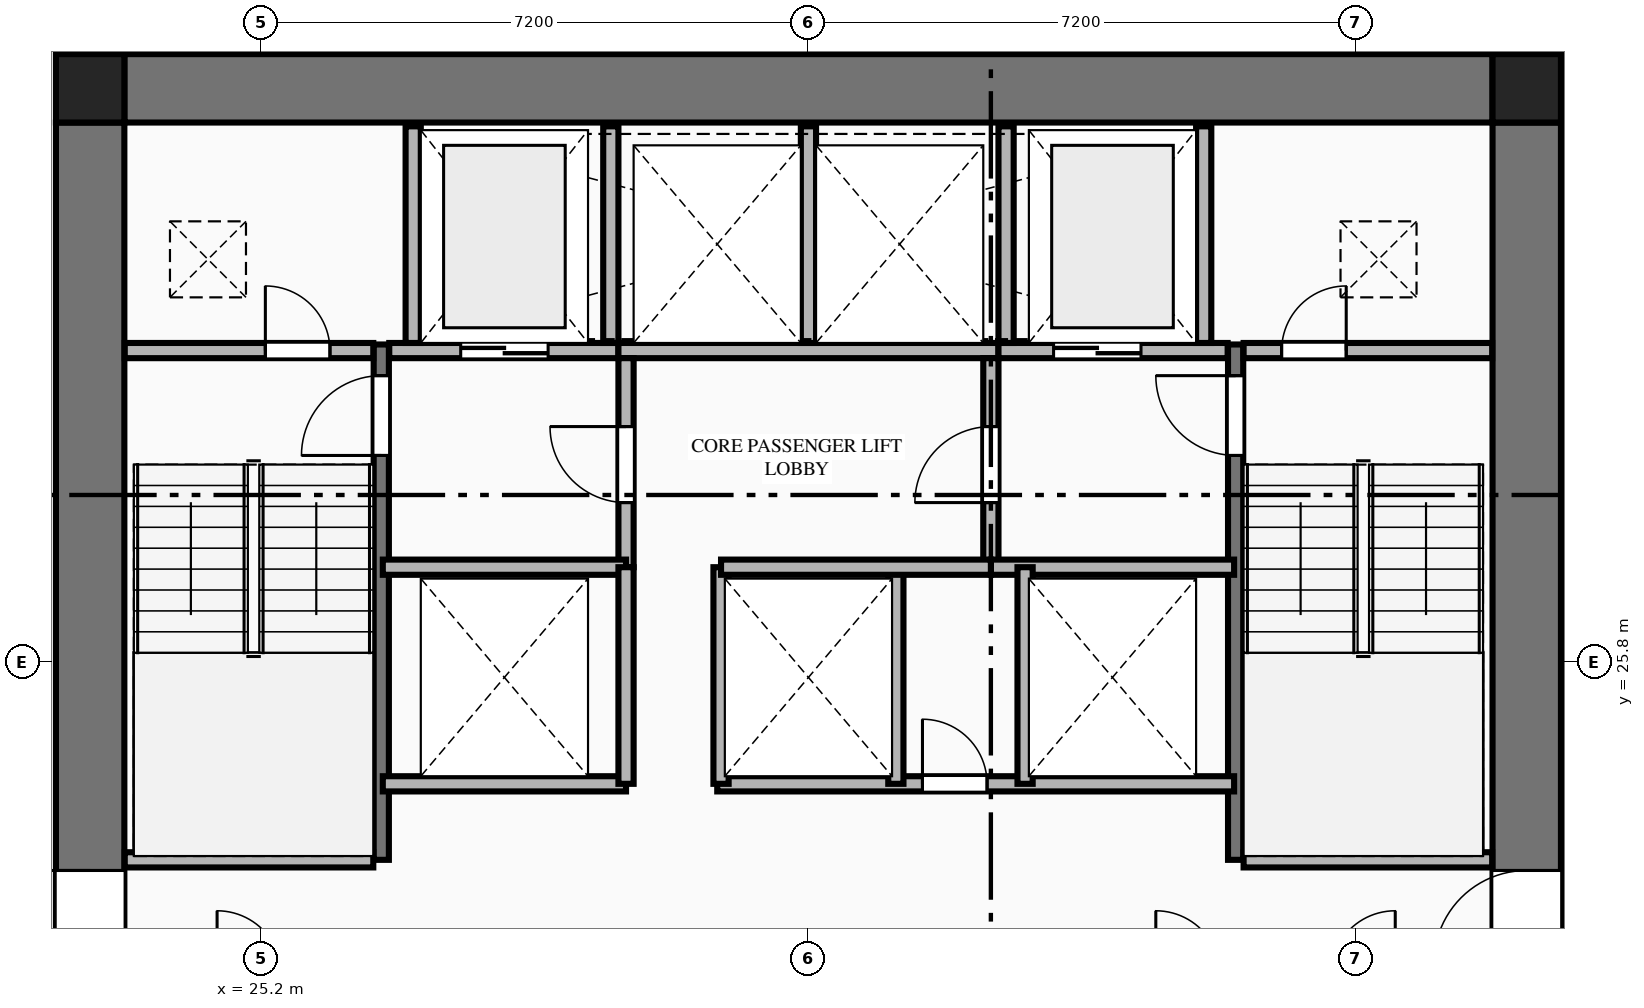
"""IFC4 building model, lengths in metres.
Left out: names, types, materials, properties, quantities, classifications, styles, units other than length and angle.
Written with IfcOpenShell. Run it as: python <this file> out.ifc"""

import sys

from ifc_helpers import new_model, si_unit, direction, frame, frame_2d, origin, origin_2d, place, context, subcontext, project, spatial, rectangle, extrude, element, fill, save


model = new_model("IFC4")
c1 = context("Model", 3, precision=1e-05, world=origin(), true_north=direction((0.0, 1.0)))
c2 = subcontext(c1, "Body", "Model", "MODEL_VIEW")
j1 = project(units=[si_unit("LENGTHUNIT", "METRE"), si_unit("PLANEANGLEUNIT", "RADIAN")], contexts=[c1])
p1 = place(None, origin())
s1 = spatial("IfcSite", under=j1, at=p1, CompositionType="ELEMENT")
p2 = place(p1, origin())
s2 = spatial("IfcBuilding", under=s1, at=p2, CompositionType="ELEMENT")
p3 = place(p2, frame((0.0, 0.0, 39.1)))
s3 = spatial("IfcBuildingStorey", under=s2, at=p3, CompositionType="ELEMENT", Elevation=39.1)
for number, where, z_axis, x_axis in (
    (1, (41.85, 33.35, 0.0), (0.0, 0.0, 1.0), (1.0, 0.0, 0.0)),
    (2, (22.95, 33.35, 0.0), (0.0, 0.0, 1.0), (1.0, 0.0, 0.0)),
):
    element("IfcColumn", number, at=place(p3, frame(where, z_axis=z_axis, x_axis=x_axis)), inside=s3, PredefinedType="COLUMN", context=c2, shape_type="SweptSolid", body=[
        extrude(rectangle(XDim=0.9, YDim=0.9, at=origin_2d()), origin(), (0.0, 0.0, 1.0), 3.55),
    ])
p4 = place(p3, frame((23.4, 33.35, 0.0), z_axis=(0.0, 0.0, 1.0), x_axis=(1.0, 0.0, 0.0)))
e3 = element("IfcWall", 3, at=p4, inside=s3, PredefinedType="SHEAR", context=c2, shape_type="SweptSolid", body=[
    extrude(rectangle(XDim=18.0, YDim=0.9, at=frame_2d((9.0, 0.0))), origin(), (0.0, 0.0, 1.0), 3.33),
])
p5 = place(p3, frame((22.95, 18.9, 0.0), z_axis=(0.0, 0.0, 1.0), x_axis=(0.0, 1.0, 0.0)))
e4 = element("IfcWall", 4, at=p5, inside=s3, PredefinedType="SHEAR", context=c2, shape_type="SweptSolid", body=[
    extrude(rectangle(XDim=14.0, YDim=0.9, at=frame_2d((7.0, 0.0))), origin(), (0.0, 0.0, 1.0), 3.33),
])
p6 = place(p5, frame((2.94, 0.0, 0.0)))
e5 = element("IfcOpeningElement", 5, at=p6, cuts=e4, PredefinedType="OPENING", context=c2, shape_type="SweptSolid", body=[
    extrude(rectangle(XDim=1.22, YDim=2.25, at=frame_2d((0.61, 1.125))), frame((0.0, 0.46, 0.0), z_axis=(0.0, -1.0, 0.0), x_axis=(1.0, 0.0, 0.0)), (0.0, 0.0, 1.0), 0.92),
])
p7 = place(p3, frame((41.85, 18.9, 0.0), z_axis=(0.0, 0.0, 1.0), x_axis=(0.0, 1.0, 0.0)))
e6 = element("IfcWall", 6, at=p7, inside=s3, PredefinedType="SHEAR", context=c2, shape_type="SweptSolid", body=[
    extrude(rectangle(XDim=14.0, YDim=0.9, at=frame_2d((7.0, 0.0))), origin(), (0.0, 0.0, 1.0), 3.33),
])
p8 = place(p7, frame((2.94, 0.0, 0.0)))
e7 = element("IfcOpeningElement", 7, at=p8, cuts=e6, PredefinedType="OPENING", context=c2, shape_type="SweptSolid", body=[
    extrude(rectangle(XDim=1.22, YDim=2.25, at=frame_2d((0.61, 1.125))), frame((0.0, 0.46, 0.0), z_axis=(0.0, -1.0, 0.0), x_axis=(1.0, 0.0, 0.0)), (0.0, 0.0, 1.0), 0.92),
])
p9 = place(p3, frame((26.78, 23.2, 0.0), z_axis=(0.0, 0.0, 1.0), x_axis=(0.0, 1.0, 0.0)))
e8 = element("IfcWall", 8, at=p9, inside=s3, PredefinedType="SHEAR", context=c2, shape_type="SweptSolid", body=[
    extrude(rectangle(XDim=6.78, YDim=0.2, at=frame_2d((3.39, 0.0))), origin(), (0.0, 0.0, 1.0), 3.55),
])
p10 = place(p9, frame((5.32, 0.0, 0.0)))
e9 = element("IfcOpeningElement", 9, at=p10, cuts=e8, PredefinedType="OPENING", context=c2, shape_type="SweptSolid", body=[
    extrude(rectangle(XDim=1.05, YDim=2.15, at=frame_2d((0.525, 1.075))), frame((0.0, 0.11, 0.0), z_axis=(0.0, -1.0, 0.0), x_axis=(1.0, 0.0, 0.0)), (0.0, 0.0, 1.0), 0.22),
])
p11 = place(p3, frame((23.405, 23.2, 0.0), z_axis=(0.0, 0.0, 1.0), x_axis=(1.0, 0.0, 0.0)))
e10 = element("IfcWall", 10, at=p11, inside=s3, PredefinedType="PLUMBINGWALL", context=c2, shape_type="SweptSolid", body=[
    extrude(rectangle(XDim=3.27, YDim=0.2, at=frame_2d((1.635, 0.0))), origin(), (0.0, 0.0, 1.0), 3.33),
])
p12 = place(p3, frame((38.02, 23.2, 0.0), z_axis=(0.0, 0.0, 1.0), x_axis=(0.0, 1.0, 0.0)))
e11 = element("IfcWall", 11, at=p12, inside=s3, PredefinedType="SHEAR", context=c2, shape_type="SweptSolid", body=[
    extrude(rectangle(XDim=6.78, YDim=0.2, at=frame_2d((3.39, 0.0))), origin(), (0.0, 0.0, 1.0), 3.55),
])
p13 = place(p12, frame((5.32, 0.0, 0.0)))
e12 = element("IfcOpeningElement", 12, at=p13, cuts=e11, PredefinedType="OPENING", context=c2, shape_type="SweptSolid", body=[
    extrude(rectangle(XDim=1.05, YDim=2.15, at=frame_2d((0.525, 1.075))), frame((0.0, 0.11, 0.0), z_axis=(0.0, -1.0, 0.0), x_axis=(1.0, 0.0, 0.0)), (0.0, 0.0, 1.0), 0.22),
])
p14 = place(p3, frame((38.125, 23.2, 0.0), z_axis=(0.0, 0.0, 1.0), x_axis=(1.0, 0.0, 0.0)))
e13 = element("IfcWall", 13, at=p14, inside=s3, PredefinedType="PLUMBINGWALL", context=c2, shape_type="SweptSolid", body=[
    extrude(rectangle(XDim=3.27, YDim=0.2, at=frame_2d((1.635, 0.0))), origin(), (0.0, 0.0, 1.0), 3.33),
])
p15 = place(p3, frame((23.405, 29.9, 0.0), z_axis=(0.0, 0.0, 1.0), x_axis=(1.0, 0.0, 0.0)))
e14 = element("IfcWall", 14, at=p15, inside=s3, PredefinedType="PLUMBINGWALL", context=c2, shape_type="SweptSolid", body=[
    extrude(rectangle(XDim=3.27, YDim=0.2, at=frame_2d((1.635, 0.0))), origin(), (0.0, 0.0, 1.0), 3.33),
])
p16 = place(p15, frame((1.85, 0.0, 0.0)))
e15 = element("IfcOpeningElement", 15, at=p16, cuts=e14, PredefinedType="OPENING", context=c2, shape_type="SweptSolid", body=[
    extrude(rectangle(XDim=0.85, YDim=2.05, at=frame_2d((0.425, 1.025))), frame((0.0, 0.11, 0.0), z_axis=(0.0, -1.0, 0.0), x_axis=(1.0, 0.0, 0.0)), (0.0, 0.0, 1.0), 0.22),
])
p17 = place(p3, frame((26.885, 29.9, 0.0), z_axis=(0.0, 0.0, 1.0), x_axis=(1.0, 0.0, 0.0)))
e16 = element("IfcWall", 16, at=p17, inside=s3, PredefinedType="PLUMBINGWALL", context=c2, shape_type="SweptSolid", body=[
    extrude(rectangle(XDim=3.015, YDim=0.2, at=frame_2d((1.507, 0.0))), origin(), (0.0, 0.0, 1.0), 3.33),
])
p18 = place(p17, frame((0.94, 0.0, 0.0)))
e17 = element("IfcOpeningElement", 17, at=p18, cuts=e16, PredefinedType="OPENING", context=c2, shape_type="SweptSolid", body=[
    extrude(rectangle(XDim=1.15, YDim=2.2, at=frame_2d((0.575, 1.1))), frame((0.0, 0.11, 0.0), z_axis=(0.0, -1.0, 0.0), x_axis=(1.0, 0.0, 0.0)), (0.0, 0.0, 1.0), 0.22),
])
p19 = place(p3, frame((29.9, 29.9, 0.0), z_axis=(0.0, 0.0, 1.0), x_axis=(1.0, 0.0, 0.0)))
e18 = element("IfcWall", 18, at=p19, inside=s3, PredefinedType="PLUMBINGWALL", context=c2, shape_type="SweptSolid", body=[
    extrude(rectangle(XDim=5.0, YDim=0.2, at=frame_2d((2.5, 0.0))), origin(), (0.0, 0.0, 1.0), 3.33),
])
p20 = place(p3, frame((34.9, 29.9, 0.0), z_axis=(0.0, 0.0, 1.0), x_axis=(1.0, 0.0, 0.0)))
e19 = element("IfcWall", 19, at=p20, inside=s3, PredefinedType="PLUMBINGWALL", context=c2, shape_type="SweptSolid", body=[
    extrude(rectangle(XDim=3.015, YDim=0.2, at=frame_2d((1.508, 0.0))), origin(), (0.0, 0.0, 1.0), 3.33),
])
p21 = place(p20, frame((0.725, 0.0, 0.0)))
e20 = element("IfcOpeningElement", 20, at=p21, cuts=e19, PredefinedType="OPENING", context=c2, shape_type="SweptSolid", body=[
    extrude(rectangle(XDim=1.15, YDim=2.2, at=frame_2d((0.575, 1.1))), frame((0.0, 0.11, 0.0), z_axis=(0.0, -1.0, 0.0), x_axis=(1.0, 0.0, 0.0)), (0.0, 0.0, 1.0), 0.22),
])
p22 = place(p3, frame((38.125, 29.9, 0.0), z_axis=(0.0, 0.0, 1.0), x_axis=(1.0, 0.0, 0.0)))
e21 = element("IfcWall", 21, at=p22, inside=s3, PredefinedType="PLUMBINGWALL", context=c2, shape_type="SweptSolid", body=[
    extrude(rectangle(XDim=3.27, YDim=0.2, at=frame_2d((1.635, 0.0))), origin(), (0.0, 0.0, 1.0), 3.33),
])
p23 = place(p22, frame((0.5, 0.0, 0.0)))
e22 = element("IfcOpeningElement", 22, at=p23, cuts=e21, PredefinedType="OPENING", context=c2, shape_type="SweptSolid", body=[
    extrude(rectangle(XDim=0.85, YDim=2.05, at=frame_2d((0.425, 1.025))), frame((0.0, 0.11, 0.0), z_axis=(0.0, -1.0, 0.0), x_axis=(1.0, 0.0, 0.0)), (0.0, 0.0, 1.0), 0.22),
])
for number, where, z_axis, x_axis in (
    (23, (27.2, 30.0, 0.0), (0.0, 0.0, 1.0), (0.0, 1.0, 0.0)),
    (24, (29.8, 30.0, 0.0), (0.0, 0.0, 1.0), (0.0, 1.0, 0.0)),
    (25, (32.4, 30.0, 0.0), (0.0, 0.0, 1.0), (0.0, 1.0, 0.0)),
    (26, (35.0, 30.0, 0.0), (0.0, 0.0, 1.0), (0.0, 1.0, 0.0)),
    (27, (37.6, 30.0, 0.0), (0.0, 0.0, 1.0), (0.0, 1.0, 0.0)),
):
    element("IfcWall", number, at=place(p3, frame(where, z_axis=z_axis, x_axis=x_axis)), inside=s3, PredefinedType="PLUMBINGWALL", context=c2, shape_type="SweptSolid", body=[
        extrude(rectangle(XDim=2.85, YDim=0.2, at=frame_2d((1.425, 0.0))), origin(), (0.0, 0.0, 1.0), 3.33),
    ])
p24 = place(p3, frame((30.0, 27.05, 0.0), z_axis=(0.0, 0.0, 1.0), x_axis=(0.0, 1.0, 0.0)))
e28 = element("IfcWall", 28, at=p24, inside=s3, PredefinedType="PLUMBINGWALL", context=c2, shape_type="SweptSolid", body=[
    extrude(rectangle(XDim=2.75, YDim=0.2, at=frame_2d((1.375, 0.0))), origin(), (0.0, 0.0, 1.0), 3.33),
])
p25 = place(p24, frame((0.85, 0.0, 0.0)))
e29 = element("IfcOpeningElement", 29, at=p25, cuts=e28, PredefinedType="OPENING", context=c2, shape_type="SweptSolid", body=[
    extrude(rectangle(XDim=1.0, YDim=2.15, at=frame_2d((0.5, 1.075))), frame((0.0, 0.11, 0.0), z_axis=(0.0, -1.0, 0.0), x_axis=(1.0, 0.0, 0.0)), (0.0, 0.0, 1.0), 0.22),
])
p26 = place(p3, frame((26.8, 27.05, 0.0), z_axis=(0.0, 0.0, 1.0), x_axis=(1.0, 0.0, 0.0)))
e30 = element("IfcWall", 30, at=p26, inside=s3, PredefinedType="PLUMBINGWALL", context=c2, shape_type="SweptSolid", body=[
    extrude(rectangle(XDim=3.2, YDim=0.2, at=frame_2d((1.6, 0.0))), origin(), (0.0, 0.0, 1.0), 3.33),
])
p27 = place(p3, frame((34.8, 27.05, 0.0), z_axis=(0.0, 0.0, 1.0), x_axis=(0.0, 1.0, 0.0)))
e31 = element("IfcWall", 31, at=p27, inside=s3, PredefinedType="PLUMBINGWALL", context=c2, shape_type="SweptSolid", body=[
    extrude(rectangle(XDim=2.75, YDim=0.2, at=frame_2d((1.375, 0.0))), origin(), (0.0, 0.0, 1.0), 3.33),
])
p28 = place(p27, frame((0.85, 0.0, 0.0)))
e32 = element("IfcOpeningElement", 32, at=p28, cuts=e31, PredefinedType="OPENING", context=c2, shape_type="SweptSolid", body=[
    extrude(rectangle(XDim=1.0, YDim=2.15, at=frame_2d((0.5, 1.075))), frame((0.0, 0.11, 0.0), z_axis=(0.0, -1.0, 0.0), x_axis=(1.0, 0.0, 0.0)), (0.0, 0.0, 1.0), 0.22),
])
for number, where, z_axis, x_axis in (
    (33, (34.8, 27.05, 0.0), (0.0, 0.0, 1.0), (1.0, 0.0, 0.0)),
    (34, (26.8, 24.2, 0.0), (0.0, 0.0, 1.0), (1.0, 0.0, 0.0)),
):
    element("IfcWall", number, at=place(p3, frame(where, z_axis=z_axis, x_axis=x_axis)), inside=s3, PredefinedType="PLUMBINGWALL", context=c2, shape_type="SweptSolid", body=[
        extrude(rectangle(XDim=3.2, YDim=0.2, at=frame_2d((1.6, 0.0))), origin(), (0.0, 0.0, 1.0), 3.33),
    ])
p29 = place(p3, frame((30.0, 24.2, 0.0), z_axis=(0.0, 0.0, 1.0), x_axis=(0.0, 1.0, 0.0)))
e35 = element("IfcWall", 35, at=p29, inside=s3, PredefinedType="PLUMBINGWALL", context=c2, shape_type="SweptSolid", body=[
    extrude(rectangle(XDim=2.85, YDim=0.2, at=frame_2d((1.425, 0.0))), origin(), (0.0, 0.0, 1.0), 3.33),
])
p30 = place(p3, frame((31.2, 24.2, 0.0), z_axis=(0.0, 0.0, 1.0), x_axis=(1.0, 0.0, 0.0)))
e36 = element("IfcWall", 36, at=p30, inside=s3, PredefinedType="PLUMBINGWALL", context=c2, shape_type="SweptSolid", body=[
    extrude(rectangle(XDim=6.8, YDim=0.2, at=frame_2d((3.4, 0.0))), origin(), (0.0, 0.0, 1.0), 3.33),
])
p31 = place(p30, frame((2.7, 0.0, 0.0)))
e37 = element("IfcOpeningElement", 37, at=p31, cuts=e36, PredefinedType="OPENING", context=c2, shape_type="SweptSolid", body=[
    extrude(rectangle(XDim=0.85, YDim=2.05, at=frame_2d((0.425, 1.025))), frame((0.0, 0.11, 0.0), z_axis=(0.0, -1.0, 0.0), x_axis=(1.0, 0.0, 0.0)), (0.0, 0.0, 1.0), 0.22),
])
for number, where, z_axis, x_axis in (
    (38, (31.25, 24.2, 0.0), (0.0, 0.0, 1.0), (0.0, 1.0, 0.0)),
    (39, (33.55, 24.2, 0.0), (0.0, 0.0, 1.0), (0.0, 1.0, 0.0)),
    (40, (35.25, 24.2, 0.0), (0.0, 0.0, 1.0), (0.0, 1.0, 0.0)),
):
    element("IfcWall", number, at=place(p3, frame(where, z_axis=z_axis, x_axis=x_axis)), inside=s3, PredefinedType="PLUMBINGWALL", context=c2, shape_type="SweptSolid", body=[
        extrude(rectangle(XDim=2.85, YDim=0.2, at=frame_2d((1.425, 0.0))), origin(), (0.0, 0.0, 1.0), 3.33),
    ])
p32 = place(p3, frame((31.25, 27.05, 0.0), z_axis=(0.0, 0.0, 1.0), x_axis=(1.0, 0.0, 0.0)))
e41 = element("IfcWall", 41, at=p32, inside=s3, PredefinedType="PLUMBINGWALL", context=c2, shape_type="SweptSolid", body=[
    extrude(rectangle(XDim=3.55, YDim=0.2, at=frame_2d((1.775, 0.0))), origin(), (0.0, 0.0, 1.0), 3.33),
])
p33 = place(p6, origin())
e42 = element("IfcDoor", 42, at=p33, inside=s3, OperationType="SINGLE_SWING_RIGHT", PredefinedType="DOOR", context=c2, shape_type="SweptSolid", body=[
    extrude(rectangle(XDim=1.22, YDim=2.25, at=frame_2d((0.61, 1.125))), frame((0.0, 0.025, 0.0), z_axis=(0.0, -1.0, 0.0), x_axis=(1.0, 0.0, 0.0)), (0.0, 0.0, 1.0), 0.05),
])
fill(e5, e42)
p34 = place(p8, origin())
e43 = element("IfcDoor", 43, at=p34, inside=s3, OperationType="SINGLE_SWING_LEFT", PredefinedType="DOOR", context=c2, shape_type="SweptSolid", body=[
    extrude(rectangle(XDim=1.22, YDim=2.25, at=frame_2d((0.61, 1.125))), frame((0.0, 0.025, 0.0), z_axis=(0.0, -1.0, 0.0), x_axis=(1.0, 0.0, 0.0)), (0.0, 0.0, 1.0), 0.05),
])
fill(e7, e43)
p35 = place(p10, origin())
e44 = element("IfcDoor", 44, at=p35, inside=s3, OperationType="SINGLE_SWING_LEFT", PredefinedType="DOOR", context=c2, shape_type="SweptSolid", body=[
    extrude(rectangle(XDim=1.05, YDim=2.15, at=frame_2d((0.525, 1.075))), frame((0.0, 0.025, 0.0), z_axis=(0.0, -1.0, 0.0), x_axis=(1.0, 0.0, 0.0)), (0.0, 0.0, 1.0), 0.05),
])
fill(e9, e44)
p36 = place(p13, origin())
e45 = element("IfcDoor", 45, at=p36, inside=s3, OperationType="SINGLE_SWING_RIGHT", PredefinedType="DOOR", context=c2, shape_type="SweptSolid", body=[
    extrude(rectangle(XDim=1.05, YDim=2.15, at=frame_2d((0.525, 1.075))), frame((0.0, 0.025, 0.0), z_axis=(0.0, -1.0, 0.0), x_axis=(1.0, 0.0, 0.0)), (0.0, 0.0, 1.0), 0.05),
])
fill(e12, e45)
p37 = place(p16, origin())
e46 = element("IfcDoor", 46, at=p37, inside=s3, OperationType="SINGLE_SWING_LEFT", PredefinedType="DOOR", context=c2, shape_type="SweptSolid", body=[
    extrude(rectangle(XDim=0.85, YDim=2.05, at=frame_2d((0.425, 1.025))), frame((0.0, 0.025, 0.0), z_axis=(0.0, -1.0, 0.0), x_axis=(1.0, 0.0, 0.0)), (0.0, 0.0, 1.0), 0.05),
])
fill(e15, e46)
p38 = place(p23, origin())
e47 = element("IfcDoor", 47, at=p38, inside=s3, OperationType="SINGLE_SWING_RIGHT", PredefinedType="DOOR", context=c2, shape_type="SweptSolid", body=[
    extrude(rectangle(XDim=0.85, YDim=2.05, at=frame_2d((0.425, 1.025))), frame((0.0, 0.025, 0.0), z_axis=(0.0, -1.0, 0.0), x_axis=(1.0, 0.0, 0.0)), (0.0, 0.0, 1.0), 0.05),
])
fill(e22, e47)
p39 = place(p18, origin())
e48 = element("IfcDoor", 48, at=p39, inside=s3, OperationType="DOUBLE_DOOR_SLIDING", PredefinedType="DOOR", context=c2, shape_type="SweptSolid", body=[
    extrude(rectangle(XDim=1.15, YDim=2.2, at=frame_2d((0.575, 1.1))), frame((0.0, 0.025, 0.0), z_axis=(0.0, -1.0, 0.0), x_axis=(1.0, 0.0, 0.0)), (0.0, 0.0, 1.0), 0.05),
])
fill(e17, e48)
p40 = place(p21, origin())
e49 = element("IfcDoor", 49, at=p40, inside=s3, OperationType="DOUBLE_DOOR_SLIDING", PredefinedType="DOOR", context=c2, shape_type="SweptSolid", body=[
    extrude(rectangle(XDim=1.15, YDim=2.2, at=frame_2d((0.575, 1.1))), frame((0.0, 0.025, 0.0), z_axis=(0.0, -1.0, 0.0), x_axis=(1.0, 0.0, 0.0)), (0.0, 0.0, 1.0), 0.05),
])
fill(e20, e49)
p41 = place(p25, origin())
e50 = element("IfcDoor", 50, at=p41, inside=s3, OperationType="SINGLE_SWING_RIGHT", PredefinedType="DOOR", context=c2, shape_type="SweptSolid", body=[
    extrude(rectangle(XDim=1.0, YDim=2.15, at=frame_2d((0.5, 1.075))), frame((0.0, 0.025, 0.0), z_axis=(0.0, -1.0, 0.0), x_axis=(1.0, 0.0, 0.0)), (0.0, 0.0, 1.0), 0.05),
])
fill(e29, e50)
p42 = place(p28, origin())
e51 = element("IfcDoor", 51, at=p42, inside=s3, OperationType="SINGLE_SWING_LEFT", PredefinedType="DOOR", context=c2, shape_type="SweptSolid", body=[
    extrude(rectangle(XDim=1.0, YDim=2.15, at=frame_2d((0.5, 1.075))), frame((0.0, 0.025, 0.0), z_axis=(0.0, -1.0, 0.0), x_axis=(1.0, 0.0, 0.0)), (0.0, 0.0, 1.0), 0.05),
])
fill(e32, e51)
p43 = place(p31, origin())
e52 = element("IfcDoor", 52, at=p43, inside=s3, OperationType="SINGLE_SWING_LEFT", PredefinedType="DOOR", context=c2, shape_type="SweptSolid", body=[
    extrude(rectangle(XDim=0.85, YDim=2.05, at=frame_2d((0.425, 1.025))), frame((0.0, 0.025, 0.0), z_axis=(0.0, -1.0, 0.0), x_axis=(1.0, 0.0, 0.0)), (0.0, 0.0, 1.0), 0.05),
])
fill(e37, e52)
save(model, sys.argv[1])
